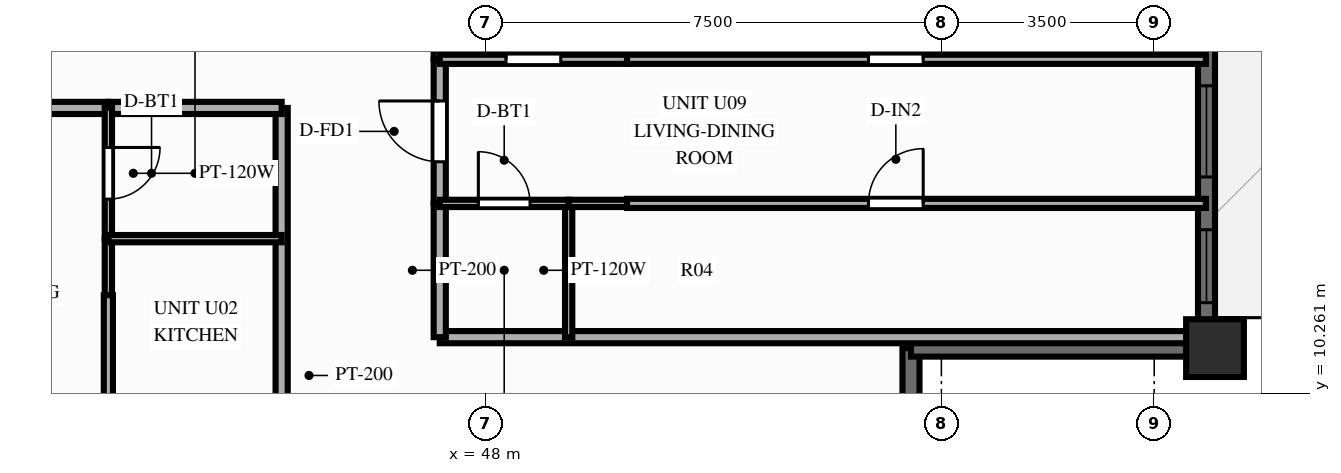
"""IFC4 building model, lengths in metres.
Left out: names, types, materials, properties, quantities, classifications, styles, units other than length and angle.
Written with IfcOpenShell. Run it as: python <this file> out.ifc"""

import sys

from ifc_helpers import new_model, si_unit, direction, frame, frame_2d, origin, origin_2d, place, context, subcontext, project, spatial, rectangle, extrude, source, transform, mapped, element, fill, save


model = new_model("IFC4")
c1 = context("Model", 3, precision=1e-05, world=origin(), true_north=direction((0.0, 1.0)))
c2 = subcontext(c1, "Body", "Model", "MODEL_VIEW")
j1 = project(units=[si_unit("LENGTHUNIT", "METRE"), si_unit("PLANEANGLEUNIT", "RADIAN")], contexts=[c1])
p1 = place(None, origin())
s1 = spatial("IfcSite", under=j1, at=p1, CompositionType="ELEMENT")
p2 = place(p1, origin())
s2 = spatial("IfcBuilding", under=s1, at=p2, CompositionType="ELEMENT")
p3 = place(p2, frame((0.0, 0.0, 159.1)))
s3 = spatial("IfcBuildingStorey", under=s2, at=p3, CompositionType="ELEMENT", Elevation=159.1)
m1 = source(origin(), c2, "Body", "SweptSolid", [
    extrude(rectangle(XDim=0.95, YDim=0.95, at=origin_2d()), origin(), (0.0, 0.0, 1.0), 3.9),
])
p4 = place(p3, frame((60.0, 11.0, 0.0), z_axis=(0.0, 0.0, 1.0), x_axis=(1.0, 0.0, 0.0)))
e1 = element("IfcColumn", 1, at=p4, inside=s3, PredefinedType="COLUMN", context=c2, shape_type="MappedRepresentation", body=[
    mapped(m1, transform((0.0, 0.0, 0.0), scale=1.0)),
])
p5 = place(p3, frame((59.86, 11.0, 0.0), z_axis=(0.0, 0.0, 1.0), x_axis=(0.0, 1.0, 0.0)))
e2 = element("IfcWall", 2, at=p5, inside=s3, PredefinedType="SOLIDWALL", context=c2, shape_type="SweptSolid", body=[
    extrude(rectangle(XDim=32.0, YDim=0.28, at=frame_2d((16.0, 0.0))), origin(), (0.0, 0.0, 1.0), 2.79),
])
p6 = place(p5, frame((0.748, 0.0, 0.85)))
e3 = element("IfcOpeningElement", 3, at=p6, cuts=e2, PredefinedType="OPENING", context=c2, shape_type="SweptSolid", body=[
    extrude(rectangle(XDim=1.2, YDim=1.5, at=frame_2d((0.6, 0.75))), frame((0.0, 0.152, 0.0), z_axis=(0.0, -1.0, 0.0), x_axis=(1.0, 0.0, 0.0)), (0.0, 0.0, 1.0), 0.304),
])
p7 = place(p5, frame((2.815, 0.0, 0.85)))
e4 = element("IfcOpeningElement", 4, at=p7, cuts=e2, PredefinedType="OPENING", context=c2, shape_type="SweptSolid", body=[
    extrude(rectangle(XDim=1.5, YDim=1.65, at=frame_2d((0.75, 0.825))), frame((0.0, 0.152, 0.0), z_axis=(0.0, -1.0, 0.0), x_axis=(1.0, 0.0, 0.0)), (0.0, 0.0, 1.0), 0.304),
])
p8 = place(p5, frame((5.117, 0.0, 0.85)))
e5 = element("IfcOpeningElement", 5, at=p8, cuts=e2, PredefinedType="OPENING", context=c2, shape_type="SweptSolid", body=[
    extrude(rectangle(XDim=1.2, YDim=1.5, at=frame_2d((0.6, 0.75))), frame((0.0, 0.152, 0.0), z_axis=(0.0, -1.0, 0.0), x_axis=(1.0, 0.0, 0.0)), (0.0, 0.0, 1.0), 0.304),
])
p9 = place(p5, frame((8.05, 0.0, 0.85)))
e6 = element("IfcOpeningElement", 6, at=p9, cuts=e2, PredefinedType="OPENING", context=c2, shape_type="SweptSolid", body=[
    extrude(rectangle(XDim=1.2, YDim=1.5, at=frame_2d((0.6, 0.75))), frame((0.0, 0.152, 0.0), z_axis=(0.0, -1.0, 0.0), x_axis=(1.0, 0.0, 0.0)), (0.0, 0.0, 1.0), 0.304),
])
p10 = place(p5, frame((10.185, 0.0, 0.85)))
e7 = element("IfcOpeningElement", 7, at=p10, cuts=e2, PredefinedType="OPENING", context=c2, shape_type="SweptSolid", body=[
    extrude(rectangle(XDim=1.5, YDim=1.65, at=frame_2d((0.75, 0.825))), frame((0.0, 0.152, 0.0), z_axis=(0.0, -1.0, 0.0), x_axis=(1.0, 0.0, 0.0)), (0.0, 0.0, 1.0), 0.304),
])
p11 = place(p5, frame((14.32, 0.0, 0.0), z_axis=(0.0, 0.0, 1.0), x_axis=(-1.0, 0.0, 0.0)))
e8 = element("IfcOpeningElement", 8, at=p11, cuts=e2, PredefinedType="OPENING", context=c2, shape_type="SweptSolid", body=[
    extrude(rectangle(XDim=1.6, YDim=2.15, at=frame_2d((0.8, 1.075))), frame((0.0, 0.152, 0.0), z_axis=(0.0, -1.0, 0.0), x_axis=(1.0, 0.0, 0.0)), (0.0, 0.0, 1.0), 0.304),
])
p12 = place(p5, frame((15.4, 0.0, 0.85)))
e9 = element("IfcOpeningElement", 9, at=p12, cuts=e2, PredefinedType="OPENING", context=c2, shape_type="SweptSolid", body=[
    extrude(rectangle(XDim=1.2, YDim=1.5, at=frame_2d((0.6, 0.75))), frame((0.0, 0.152, 0.0), z_axis=(0.0, -1.0, 0.0), x_axis=(1.0, 0.0, 0.0)), (0.0, 0.0, 1.0), 0.304),
])
p13 = place(p5, frame((17.58, 0.0, 0.85)))
e10 = element("IfcOpeningElement", 10, at=p13, cuts=e2, PredefinedType="OPENING", context=c2, shape_type="SweptSolid", body=[
    extrude(rectangle(XDim=1.2, YDim=1.5, at=frame_2d((0.6, 0.75))), frame((0.0, 0.152, 0.0), z_axis=(0.0, -1.0, 0.0), x_axis=(1.0, 0.0, 0.0)), (0.0, 0.0, 1.0), 0.304),
])
p14 = place(p5, frame((19.715, 0.0, 0.85)))
e11 = element("IfcOpeningElement", 11, at=p14, cuts=e2, PredefinedType="OPENING", context=c2, shape_type="SweptSolid", body=[
    extrude(rectangle(XDim=1.5, YDim=1.65, at=frame_2d((0.75, 0.825))), frame((0.0, 0.152, 0.0), z_axis=(0.0, -1.0, 0.0), x_axis=(1.0, 0.0, 0.0)), (0.0, 0.0, 1.0), 0.304),
])
p15 = place(p5, frame((22.15, 0.0, 0.85)))
e12 = element("IfcOpeningElement", 12, at=p15, cuts=e2, PredefinedType="OPENING", context=c2, shape_type="SweptSolid", body=[
    extrude(rectangle(XDim=1.8, YDim=1.65, at=frame_2d((0.9, 0.825))), frame((0.0, 0.152, 0.0), z_axis=(0.0, -1.0, 0.0), x_axis=(1.0, 0.0, 0.0)), (0.0, 0.0, 1.0), 0.304),
])
p16 = place(p5, frame((25.633, 0.0, 0.85)))
e13 = element("IfcOpeningElement", 13, at=p16, cuts=e2, PredefinedType="OPENING", context=c2, shape_type="SweptSolid", body=[
    extrude(rectangle(XDim=0.7, YDim=1.5, at=frame_2d((0.35, 0.75))), frame((0.0, 0.152, 0.0), z_axis=(0.0, -1.0, 0.0), x_axis=(1.0, 0.0, 0.0)), (0.0, 0.0, 1.0), 0.304),
])
p17 = place(p5, frame((27.085, 0.0, 0.85)))
e14 = element("IfcOpeningElement", 14, at=p17, cuts=e2, PredefinedType="OPENING", context=c2, shape_type="SweptSolid", body=[
    extrude(rectangle(XDim=1.5, YDim=1.65, at=frame_2d((0.75, 0.825))), frame((0.0, 0.152, 0.0), z_axis=(0.0, -1.0, 0.0), x_axis=(1.0, 0.0, 0.0)), (0.0, 0.0, 1.0), 0.304),
])
p18 = place(p5, frame((29.602, 0.0, 0.85)))
e15 = element("IfcOpeningElement", 15, at=p18, cuts=e2, PredefinedType="OPENING", context=c2, shape_type="SweptSolid", body=[
    extrude(rectangle(XDim=1.5, YDim=1.65, at=frame_2d((0.75, 0.825))), frame((0.0, 0.152, 0.0), z_axis=(0.0, -1.0, 0.0), x_axis=(1.0, 0.0, 0.0)), (0.0, 0.0, 1.0), 0.304),
])
for number, where, z_axis, x_axis in (
    (16, (55.0, 6.08, 0.0), (0.0, 0.0, 1.0), (0.0, 1.0, 0.0)),
    (17, (55.0, 11.0, 0.0), (0.0, 0.0, 1.0), (1.0, 0.0, 0.0)),
):
    element("IfcWall", number, at=place(p3, frame(where, z_axis=z_axis, x_axis=x_axis)), inside=s3, PredefinedType="SOLIDWALL", context=c2, shape_type="SweptSolid", body=[
        extrude(rectangle(XDim=4.92, YDim=0.28, at=frame_2d((2.46, 0.0))), origin(), (0.0, 0.0, 1.0), 2.79),
    ])
p19 = place(p3, frame((44.65, 14.95, 0.0), z_axis=(0.0, 0.0, 1.0), x_axis=(0.0, -1.0, 0.0)))
e18 = element("IfcWall", 18, at=p19, inside=s3, PredefinedType="PARTITIONING", context=c2, shape_type="SweptSolid", body=[
    extrude(rectangle(XDim=8.8, YDim=0.2, at=frame_2d((4.4, 0.0))), origin(), (0.0, 0.0, 1.0), 2.79),
])
p20 = place(p3, frame((38.0, 14.95, 0.0), z_axis=(0.0, 0.0, 1.0), x_axis=(1.0, 0.0, 0.0)))
e19 = element("IfcWall", 19, at=p20, inside=s3, PredefinedType="PARTITIONING", context=c2, shape_type="SweptSolid", body=[
    extrude(rectangle(XDim=3.8, YDim=0.2, at=frame_2d((1.9, 0.0))), origin(), (0.0, 0.0, 1.0), 3.69),
])
p21 = place(p20, frame((1.4, 0.0, 0.0)))
e20 = element("IfcOpeningElement", 20, at=p21, cuts=e19, PredefinedType="OPENING", context=c2, shape_type="SweptSolid", body=[
    extrude(rectangle(XDim=1.0, YDim=2.15, at=frame_2d((0.5, 1.075))), frame((0.0, 0.112, 0.0), z_axis=(0.0, -1.0, 0.0), x_axis=(1.0, 0.0, 0.0)), (0.0, 0.0, 1.0), 0.224),
])
p22 = place(p3, frame((41.8, 14.95, 0.0), z_axis=(0.0, 0.0, 1.0), x_axis=(1.0, 0.0, 0.0)))
e21 = element("IfcWall", 21, at=p22, inside=s3, PredefinedType="PARTITIONING", context=c2, shape_type="SweptSolid", body=[
    extrude(rectangle(XDim=2.85, YDim=0.2, at=frame_2d((1.425, 0.0))), origin(), (0.0, 0.0, 1.0), 3.69),
])
p23 = place(p3, frame((41.8, 14.95, 0.0), z_axis=(0.0, 0.0, 1.0), x_axis=(0.0, -1.0, 0.0)))
e22 = element("IfcWall", 22, at=p23, inside=s3, PredefinedType="PARTITIONING", context=c2, shape_type="SweptSolid", body=[
    extrude(rectangle(XDim=2.15, YDim=0.12, at=frame_2d((1.075, 0.0))), origin(), (0.0, 0.0, 1.0), 3.69),
])
p24 = place(p23, frame((0.65, 0.0, 0.0)))
e23 = element("IfcOpeningElement", 23, at=p24, cuts=e22, PredefinedType="OPENING", context=c2, shape_type="SweptSolid", body=[
    extrude(rectangle(XDim=0.85, YDim=2.05, at=frame_2d((0.425, 1.025))), frame((0.0, 0.072, 0.0), z_axis=(0.0, -1.0, 0.0), x_axis=(1.0, 0.0, 0.0)), (0.0, 0.0, 1.0), 0.144),
])
p25 = place(p3, frame((41.8, 12.8, 0.0), z_axis=(0.0, 0.0, 1.0), x_axis=(0.0, -1.0, 0.0)))
e24 = element("IfcWall", 24, at=p25, inside=s3, PredefinedType="PARTITIONING", context=c2, shape_type="SweptSolid", body=[
    extrude(rectangle(XDim=0.93, YDim=0.12, at=frame_2d((0.465, 0.0))), origin(), (0.0, 0.0, 1.0), 3.69),
])
p26 = place(p3, frame((41.8, 12.8, 0.0), z_axis=(0.0, 0.0, 1.0), x_axis=(1.0, 0.0, 0.0)))
e25 = element("IfcWall", 25, at=p26, inside=s3, PredefinedType="PARTITIONING", context=c2, shape_type="SweptSolid", body=[
    extrude(rectangle(XDim=2.85, YDim=0.12, at=frame_2d((1.425, 0.0))), origin(), (0.0, 0.0, 1.0), 3.69),
])
p27 = place(p3, frame((41.8, 11.87, 0.0), z_axis=(0.0, 0.0, 1.0), x_axis=(0.0, -1.0, 0.0)))
e26 = element("IfcWall", 26, at=p27, inside=s3, PredefinedType="PARTITIONING", context=c2, shape_type="SweptSolid", body=[
    extrude(rectangle(XDim=5.72, YDim=0.15, at=frame_2d((2.86, 0.0))), origin(), (0.0, 0.0, 1.0), 3.69),
])
p28 = place(p27, frame((2.229, 0.0, 0.0)))
e27 = element("IfcOpeningElement", 27, at=p28, cuts=e26, PredefinedType="OPENING", context=c2, shape_type="SweptSolid", body=[
    extrude(rectangle(XDim=0.9, YDim=2.1, at=frame_2d((0.45, 1.05))), frame((0.0, 0.087, 0.0), z_axis=(0.0, -1.0, 0.0), x_axis=(1.0, 0.0, 0.0)), (0.0, 0.0, 1.0), 0.174),
])
p29 = place(p3, frame((47.25, 11.18, 0.0), z_axis=(0.0, 0.0, 1.0), x_axis=(1.0, 0.0, 0.0)))
e28 = element("IfcWall", 28, at=p29, inside=s3, PredefinedType="PARTITIONING", context=c2, shape_type="SweptSolid", body=[
    extrude(rectangle(XDim=12.6, YDim=0.2, at=frame_2d((6.3, 0.0))), origin(), (0.0, 0.0, 1.0), 3.69),
])
p30 = place(p3, frame((47.25, 11.18, 0.0), z_axis=(0.0, 0.0, 1.0), x_axis=(0.0, 1.0, 0.0)))
e29 = element("IfcWall", 29, at=p30, inside=s3, PredefinedType="PARTITIONING", context=c2, shape_type="SweptSolid", body=[
    extrude(rectangle(XDim=2.2, YDim=0.2, at=frame_2d((1.1, 0.0))), origin(), (0.0, 0.0, 1.0), 3.69),
])
p31 = place(p3, frame((47.25, 13.38, 0.0), z_axis=(0.0, 0.0, 1.0), x_axis=(0.0, 1.0, 0.0)))
e30 = element("IfcWall", 30, at=p31, inside=s3, PredefinedType="PARTITIONING", context=c2, shape_type="SweptSolid", body=[
    extrude(rectangle(XDim=2.37, YDim=0.2, at=frame_2d((1.185, 0.0))), origin(), (0.0, 0.0, 1.0), 3.69),
])
p32 = place(p31, frame((0.685, 0.0, 0.0)))
e31 = element("IfcOpeningElement", 31, at=p32, cuts=e30, PredefinedType="OPENING", context=c2, shape_type="SweptSolid", body=[
    extrude(rectangle(XDim=1.0, YDim=2.15, at=frame_2d((0.5, 1.075))), frame((0.0, 0.112, 0.0), z_axis=(0.0, -1.0, 0.0), x_axis=(1.0, 0.0, 0.0)), (0.0, 0.0, 1.0), 0.224),
])
p33 = place(p3, frame((47.25, 15.75, 0.0), z_axis=(0.0, 0.0, 1.0), x_axis=(0.0, 1.0, 0.0)))
e32 = element("IfcWall", 32, at=p33, inside=s3, PredefinedType="PARTITIONING", context=c2, shape_type="SweptSolid", body=[
    extrude(rectangle(XDim=2.801, YDim=0.2, at=frame_2d((1.4, 0.0))), origin(), (0.0, 0.0, 1.0), 3.69),
])
p34 = place(p3, frame((49.37, 11.18, 0.0), z_axis=(0.0, 0.0, 1.0), x_axis=(0.0, 1.0, 0.0)))
e33 = element("IfcWall", 33, at=p34, inside=s3, PredefinedType="PARTITIONING", context=c2, shape_type="SweptSolid", body=[
    extrude(rectangle(XDim=2.2, YDim=0.12, at=frame_2d((1.1, 0.0))), origin(), (0.0, 0.0, 1.0), 3.69),
])
p35 = place(p3, frame((50.33, 15.75, 0.0), z_axis=(0.0, 0.0, 1.0), x_axis=(0.0, 1.0, 0.0)))
e34 = element("IfcWall", 34, at=p35, inside=s3, PredefinedType="PARTITIONING", context=c2, shape_type="SweptSolid", body=[
    extrude(rectangle(XDim=2.801, YDim=0.15, at=frame_2d((1.4, 0.0))), origin(), (0.0, 0.0, 1.0), 3.69),
])
p36 = place(p3, frame((47.25, 13.38, 0.0), z_axis=(0.0, 0.0, 1.0), x_axis=(1.0, 0.0, 0.0)))
e35 = element("IfcWall", 35, at=p36, inside=s3, PredefinedType="PARTITIONING", context=c2, shape_type="SweptSolid", body=[
    extrude(rectangle(XDim=2.12, YDim=0.12, at=frame_2d((1.06, 0.0))), origin(), (0.0, 0.0, 1.0), 3.69),
])
p37 = place(p36, frame((0.635, 0.0, 0.0)))
e36 = element("IfcOpeningElement", 36, at=p37, cuts=e35, PredefinedType="OPENING", context=c2, shape_type="SweptSolid", body=[
    extrude(rectangle(XDim=0.85, YDim=2.05, at=frame_2d((0.425, 1.025))), frame((0.0, 0.072, 0.0), z_axis=(0.0, -1.0, 0.0), x_axis=(1.0, 0.0, 0.0)), (0.0, 0.0, 1.0), 0.144),
])
p38 = place(p3, frame((49.37, 13.38, 0.0), z_axis=(0.0, 0.0, 1.0), x_axis=(1.0, 0.0, 0.0)))
e37 = element("IfcWall", 37, at=p38, inside=s3, PredefinedType="PARTITIONING", context=c2, shape_type="SweptSolid", body=[
    extrude(rectangle(XDim=0.96, YDim=0.12, at=frame_2d((0.48, 0.0))), origin(), (0.0, 0.0, 1.0), 3.69),
])
p39 = place(p3, frame((50.33, 13.38, 0.0), z_axis=(0.0, 0.0, 1.0), x_axis=(1.0, 0.0, 0.0)))
e38 = element("IfcWall", 38, at=p39, inside=s3, PredefinedType="PARTITIONING", context=c2, shape_type="SweptSolid", body=[
    extrude(rectangle(XDim=9.52, YDim=0.15, at=frame_2d((4.76, 0.0))), origin(), (0.0, 0.0, 1.0), 3.69),
])
p40 = place(p39, frame((3.971, 0.0, 0.0)))
e39 = element("IfcOpeningElement", 39, at=p40, cuts=e38, PredefinedType="OPENING", context=c2, shape_type="SweptSolid", body=[
    extrude(rectangle(XDim=0.9, YDim=2.1, at=frame_2d((0.45, 1.05))), frame((0.0, 0.087, 0.0), z_axis=(0.0, -1.0, 0.0), x_axis=(1.0, 0.0, 0.0)), (0.0, 0.0, 1.0), 0.174),
])
p41 = place(p3, frame((47.25, 15.75, 0.0), z_axis=(0.0, 0.0, 1.0), x_axis=(1.0, 0.0, 0.0)))
e40 = element("IfcWall", 40, at=p41, inside=s3, PredefinedType="PARTITIONING", context=c2, shape_type="SweptSolid", body=[
    extrude(rectangle(XDim=3.08, YDim=0.15, at=frame_2d((1.54, 0.0))), origin(), (0.0, 0.0, 1.0), 3.69),
])
p42 = place(p41, frame((1.09, 0.0, 0.0)))
e41 = element("IfcOpeningElement", 41, at=p42, cuts=e40, PredefinedType="OPENING", context=c2, shape_type="SweptSolid", body=[
    extrude(rectangle(XDim=0.9, YDim=2.1, at=frame_2d((0.45, 1.05))), frame((0.0, 0.087, 0.0), z_axis=(0.0, -1.0, 0.0), x_axis=(1.0, 0.0, 0.0)), (0.0, 0.0, 1.0), 0.174),
])
p43 = place(p3, frame((50.33, 15.75, 0.0), z_axis=(0.0, 0.0, 1.0), x_axis=(1.0, 0.0, 0.0)))
e42 = element("IfcWall", 42, at=p43, inside=s3, PredefinedType="PARTITIONING", context=c2, shape_type="SweptSolid", body=[
    extrude(rectangle(XDim=9.52, YDim=0.15, at=frame_2d((4.76, 0.0))), origin(), (0.0, 0.0, 1.0), 3.69),
])
p44 = place(p43, frame((3.971, 0.0, 0.0)))
e43 = element("IfcOpeningElement", 43, at=p44, cuts=e42, PredefinedType="OPENING", context=c2, shape_type="SweptSolid", body=[
    extrude(rectangle(XDim=0.9, YDim=2.1, at=frame_2d((0.45, 1.05))), frame((0.0, 0.087, 0.0), z_axis=(0.0, -1.0, 0.0), x_axis=(1.0, 0.0, 0.0)), (0.0, 0.0, 1.0), 0.174),
])
m2 = source(origin(), c2, "Body", "SweptSolid", [
    extrude(rectangle(XDim=1.2, YDim=1.5, at=frame_2d((0.6, 0.75))), frame((0.0, 0.03, 0.0), z_axis=(0.0, -1.0, 0.0), x_axis=(1.0, 0.0, 0.0)), (0.0, 0.0, 1.0), 0.06),
])
p45 = place(p6, origin())
e44 = element("IfcWindow", 44, at=p45, inside=s3, PartitioningType="SINGLE_PANEL", PredefinedType="WINDOW", context=c2, shape_type="MappedRepresentation", body=[
    mapped(m2, transform((0.0, 0.0, 0.0), scale=1.0)),
])
fill(e3, e44)
m3 = source(origin(), c2, "Body", "SweptSolid", [
    extrude(rectangle(XDim=1.5, YDim=1.65, at=frame_2d((0.75, 0.825))), frame((0.0, 0.03, 0.0), z_axis=(0.0, -1.0, 0.0), x_axis=(1.0, 0.0, 0.0)), (0.0, 0.0, 1.0), 0.06),
])
p46 = place(p7, origin())
e45 = element("IfcWindow", 45, at=p46, inside=s3, PartitioningType="SINGLE_PANEL", PredefinedType="WINDOW", context=c2, shape_type="MappedRepresentation", body=[
    mapped(m3, transform((0.0, 0.0, 0.0), scale=1.0)),
])
fill(e4, e45)
m4 = source(origin(), c2, "Body", "SweptSolid", [
    extrude(rectangle(XDim=0.85, YDim=2.05, at=frame_2d((0.425, 1.025))), frame((0.0, 0.025, 0.0), z_axis=(0.0, -1.0, 0.0), x_axis=(1.0, 0.0, 0.0)), (0.0, 0.0, 1.0), 0.05),
])
p47 = place(p24, origin())
e46 = element("IfcDoor", 46, at=p47, inside=s3, OperationType="SINGLE_SWING_LEFT", PredefinedType="DOOR", context=c2, shape_type="MappedRepresentation", body=[
    mapped(m4, transform((0.0, 0.0, 0.0), scale=1.0)),
])
fill(e23, e46)
m5 = source(origin(), c2, "Body", "SweptSolid", [
    extrude(rectangle(XDim=1.0, YDim=2.15, at=frame_2d((0.5, 1.075))), frame((0.0, 0.025, 0.0), z_axis=(0.0, -1.0, 0.0), x_axis=(1.0, 0.0, 0.0)), (0.0, 0.0, 1.0), 0.05),
])
p48 = place(p32, origin())
e47 = element("IfcDoor", 47, at=p48, inside=s3, OperationType="SINGLE_SWING_RIGHT", PredefinedType="DOOR", context=c2, shape_type="MappedRepresentation", body=[
    mapped(m5, transform((0.0, 0.0, 0.0), scale=1.0)),
])
fill(e31, e47)
p49 = place(p37, origin())
e48 = element("IfcDoor", 48, at=p49, inside=s3, OperationType="SINGLE_SWING_LEFT", PredefinedType="DOOR", context=c2, shape_type="MappedRepresentation", body=[
    mapped(m4, transform((0.0, 0.0, 0.0), scale=1.0)),
])
fill(e36, e48)
m6 = source(origin(), c2, "Body", "SweptSolid", [
    extrude(rectangle(XDim=0.9, YDim=2.1, at=frame_2d((0.45, 1.05))), frame((0.0, 0.025, 0.0), z_axis=(0.0, -1.0, 0.0), x_axis=(1.0, 0.0, 0.0)), (0.0, 0.0, 1.0), 0.05),
])
p50 = place(p40, origin())
e49 = element("IfcDoor", 49, at=p50, inside=s3, OperationType="SINGLE_SWING_RIGHT", PredefinedType="DOOR", context=c2, shape_type="MappedRepresentation", body=[
    mapped(m6, transform((0.0, 0.0, 0.0), scale=1.0)),
])
fill(e39, e49)
p51 = place(p42, origin())
e50 = element("IfcDoor", 50, at=p51, inside=s3, OperationType="SINGLE_SWING_LEFT", PredefinedType="DOOR", context=c2, shape_type="MappedRepresentation", body=[
    mapped(m6, transform((0.0, 0.0, 0.0), scale=1.0)),
])
fill(e41, e50)
p52 = place(p44, origin())
e51 = element("IfcDoor", 51, at=p52, inside=s3, OperationType="SINGLE_SWING_RIGHT", PredefinedType="DOOR", context=c2, shape_type="MappedRepresentation", body=[
    mapped(m6, transform((0.0, 0.0, 0.0), scale=1.0)),
])
fill(e43, e51)
save(model, sys.argv[1])
